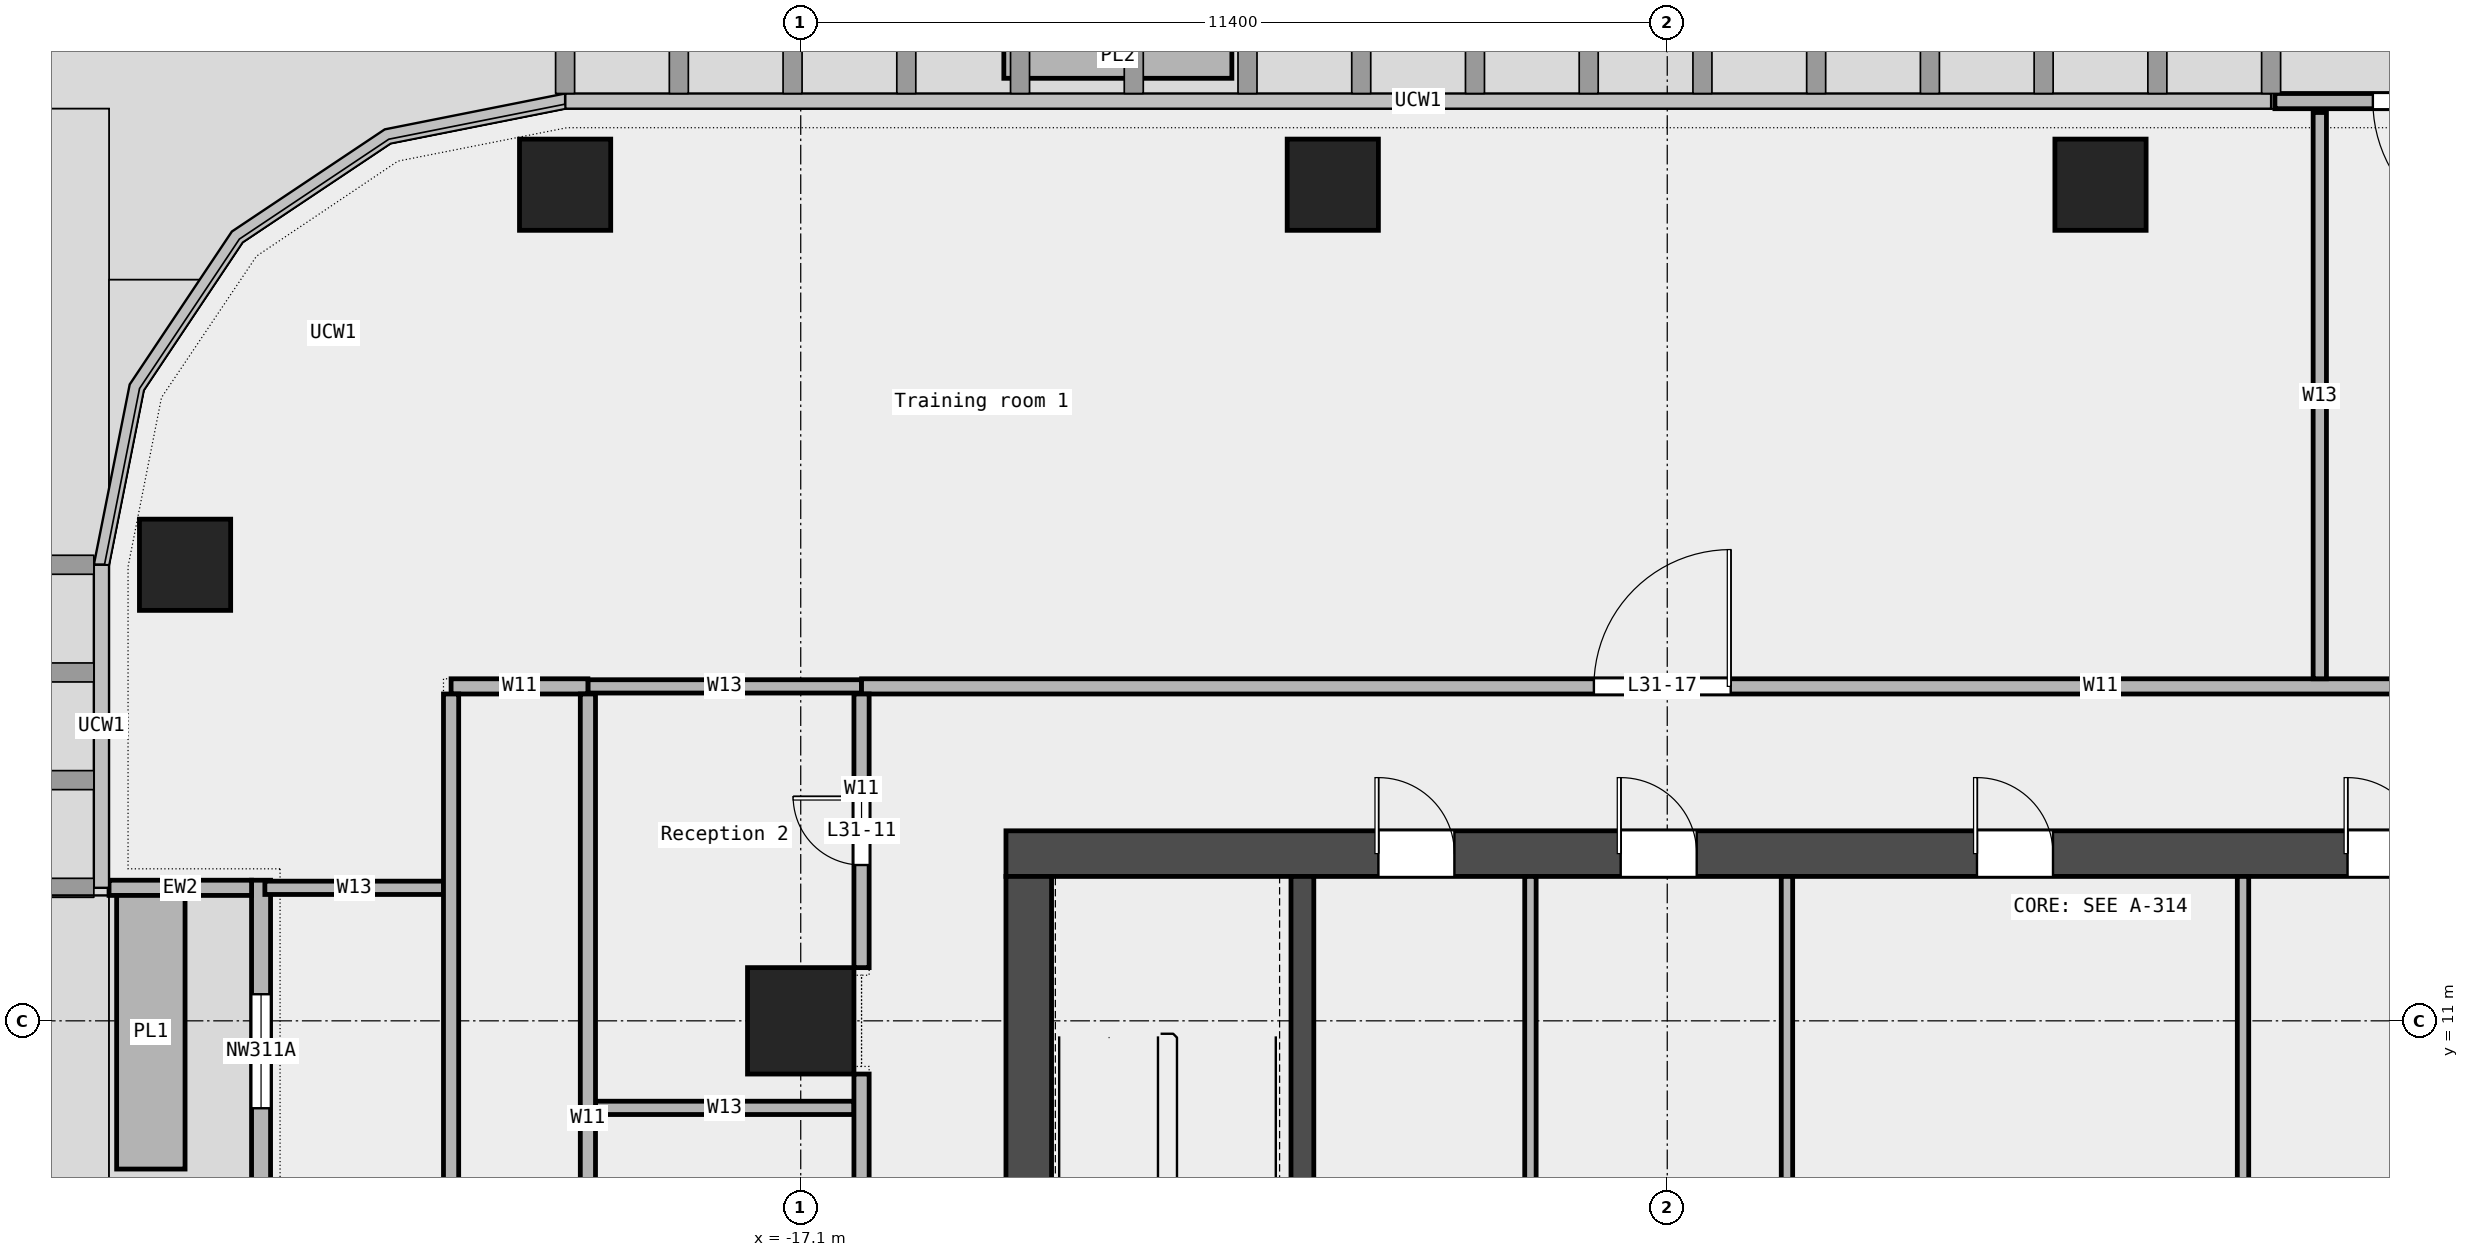
"""IFC4 building model, lengths in metres.
Left out: names, types, materials, properties, quantities, classifications, styles, units other than length and angle.
Written with IfcOpenShell. Run it as: python <this file> out.ifc"""

import sys

from ifc_helpers import new_model, si_unit, direction, frame, frame_2d, origin, origin_2d, place, context, subcontext, project, spatial, rectangle, extrude, element, fill, save


model = new_model("IFC4")
c1 = context("Model", 3, precision=1e-05, world=origin(), true_north=direction((0.0, 1.0)))
c2 = subcontext(c1, "Body", "Model", "MODEL_VIEW")
j1 = project(units=[si_unit("LENGTHUNIT", "METRE"), si_unit("PLANEANGLEUNIT", "RADIAN")], contexts=[c1])
p1 = place(None, origin())
s1 = spatial("IfcSite", under=j1, at=p1, CompositionType="ELEMENT")
p2 = place(p1, origin())
s2 = spatial("IfcBuilding", under=s1, at=p2, CompositionType="ELEMENT")
p3 = place(p2, frame((0.0, 0.0, 157.0)))
s3 = spatial("IfcBuildingStorey", under=s2, at=p3, CompositionType="ELEMENT", Elevation=157.0)
for number, where, z_axis, x_axis in (
    (1, (0.0, 22.0, 0.0), (0.0, 0.0, 1.0), (1.0, 0.0, 0.0)),
    (2, (-10.1, 22.0, 0.0), (0.0, 0.0, 1.0), (1.0, 0.0, 0.0)),
    (3, (-20.2, 22.0, 0.0), (0.0, 0.0, 1.0), (1.0, 0.0, 0.0)),
    (4, (-25.2, 17.0, 0.0), (0.0, 0.0, 1.0), (1.0, 0.0, 0.0)),
):
    element("IfcColumn", number, at=place(p3, frame(where, z_axis=z_axis, x_axis=x_axis)), inside=s3, PredefinedType="COLUMN", context=c2, shape_type="SweptSolid", body=[
        extrude(rectangle(XDim=1.2, YDim=1.2, at=origin_2d()), origin(), (0.0, 0.0, 1.0), 3.6),
    ])
p4 = place(p3, frame((-17.1, 11.0, 0.0), z_axis=(0.0, 0.0, 1.0), x_axis=(1.0, 0.0, 0.0)))
e5 = element("IfcColumn", 5, at=p4, inside=s3, PredefinedType="COLUMN", context=c2, shape_type="SweptSolid", body=[
    extrude(rectangle(XDim=1.4, YDim=1.4, at=origin_2d()), origin(), (0.0, 0.0, 1.0), 3.6),
])
p5 = place(p3, frame((-24.2, 12.85, 0.0), z_axis=(0.0, 0.0, 1.0), x_axis=(0.0, -1.0, 0.0)))
e6 = element("IfcWall", 6, at=p5, inside=s3, PredefinedType="STANDARD", context=c2, shape_type="SweptSolid", body=[
    extrude(rectangle(XDim=12.95, YDim=0.25, at=frame_2d((6.475, 0.0))), origin(), (0.0, 0.0, 1.0), 3.6),
])
p6 = place(p5, frame((1.5, 0.0, 0.45)))
e7 = element("IfcOpeningElement", 7, at=p6, cuts=e6, PredefinedType="OPENING", context=c2, shape_type="SweptSolid", body=[
    extrude(rectangle(XDim=1.5, YDim=2.4, at=frame_2d((0.75, 1.2))), frame((0.0, 0.137, 0.0), z_axis=(0.0, -1.0, 0.0), x_axis=(1.0, 0.0, 0.0)), (0.0, 0.0, 1.0), 0.274),
])
p7 = place(p5, frame((4.25, 0.0, 0.0)))
e8 = element("IfcOpeningElement", 8, at=p7, cuts=e6, PredefinedType="OPENING", context=c2, shape_type="SweptSolid", body=[
    extrude(rectangle(XDim=1.8, YDim=2.4, at=frame_2d((0.9, 1.2))), frame((0.0, 0.137, 0.0), z_axis=(0.0, -1.0, 0.0), x_axis=(1.0, 0.0, 0.0)), (0.0, 0.0, 1.0), 0.274),
])
p8 = place(p5, frame((10.0, 0.0, 0.45)))
e9 = element("IfcOpeningElement", 9, at=p8, cuts=e6, PredefinedType="OPENING", context=c2, shape_type="SweptSolid", body=[
    extrude(rectangle(XDim=1.5, YDim=2.4, at=frame_2d((0.75, 1.2))), frame((0.0, 0.137, 0.0), z_axis=(0.0, -1.0, 0.0), x_axis=(1.0, 0.0, 0.0)), (0.0, 0.0, 1.0), 0.274),
])
p9 = place(p3, frame((-26.2, 12.75, 0.0), z_axis=(0.0, 0.0, 1.0), x_axis=(1.0, 0.0, 0.0)))
e10 = element("IfcWall", 10, at=p9, inside=s3, PredefinedType="STANDARD", context=c2, shape_type="SweptSolid", body=[
    extrude(rectangle(XDim=1.875, YDim=0.2, at=frame_2d((0.938, 0.0))), origin(), (0.0, 0.0, 1.0), 3.6),
])
p10 = place(p3, frame((-25.65, 12.65, 0.0), z_axis=(0.0, 0.0, 1.0), x_axis=(0.0, -1.0, 0.0)))
e11 = element("IfcWall", 11, at=p10, inside=s3, PredefinedType="STANDARD", context=c2, shape_type="SweptSolid", body=[
    extrude(rectangle(XDim=3.6, YDim=0.9, at=frame_2d((1.8, 0.0))), origin(), (0.0, 0.0, 1.0), 0.7),
])
p11 = place(p3, frame((6.683, 23.1, 0.0), z_axis=(0.0, 0.0, 1.0), x_axis=(-1.0, 0.0, 0.0)))
e12 = element("IfcWall", 12, at=p11, inside=s3, PredefinedType="STANDARD", context=c2, shape_type="SweptSolid", body=[
    extrude(rectangle(XDim=4.389, YDim=0.2, at=frame_2d((2.194, 0.0))), origin(), (0.0, 0.0, 1.0), 3.6),
])
p12 = place(p11, frame((1.3, 0.0, 0.0)))
e13 = element("IfcOpeningElement", 13, at=p12, cuts=e12, PredefinedType="OPENING", context=c2, shape_type="SweptSolid", body=[
    extrude(rectangle(XDim=1.8, YDim=2.4, at=frame_2d((0.9, 1.2))), frame((0.0, 0.112, 0.0), z_axis=(0.0, -1.0, 0.0), x_axis=(1.0, 0.0, 0.0)), (0.0, 0.0, 1.0), 0.224),
])
p13 = place(p3, frame((-11.428, 23.7, 0.0), z_axis=(0.0, 0.0, 1.0), x_axis=(-1.0, 0.0, 0.0)))
e14 = element("IfcWall", 14, at=p13, inside=s3, PredefinedType="STANDARD", context=c2, shape_type="SweptSolid", body=[
    extrude(rectangle(XDim=3.0, YDim=0.6, at=frame_2d((1.5, 0.0))), origin(), (0.0, 0.0, 1.0), 0.7),
])
p14 = place(p3, frame((-19.8, 9.855, 0.0), z_axis=(0.0, 0.0, 1.0), x_axis=(1.0, 0.0, 0.0)))
e15 = element("IfcWall", 15, at=p14, inside=s3, PredefinedType="PARTITIONING", context=c2, shape_type="SweptSolid", body=[
    extrude(rectangle(XDim=3.4, YDim=0.175, at=frame_2d((1.7, 0.0))), origin(), (0.0, 0.0, 1.0), 3.6),
])
p15 = place(p3, frame((-24.15, 12.75, 0.0), z_axis=(0.0, 0.0, 1.0), x_axis=(1.0, 0.0, 0.0)))
e16 = element("IfcWall", 16, at=p15, inside=s3, PredefinedType="PARTITIONING", context=c2, shape_type="SweptSolid", body=[
    extrude(rectangle(XDim=2.35, YDim=0.175, at=frame_2d((1.175, 0.0))), origin(), (0.0, 0.0, 1.0), 3.6),
])
p16 = place(p3, frame((-19.9, 15.4, 0.0), z_axis=(0.0, 0.0, 1.0), x_axis=(1.0, 0.0, 0.0)))
e17 = element("IfcWall", 17, at=p16, inside=s3, PredefinedType="PARTITIONING", context=c2, shape_type="SweptSolid", body=[
    extrude(rectangle(XDim=3.6, YDim=0.175, at=frame_2d((1.8, 0.0))), origin(), (0.0, 0.0, 1.0), 3.6),
])
p17 = place(p3, frame((-21.7, 15.4, 0.0), z_axis=(0.0, 0.0, 1.0), x_axis=(1.0, 0.0, 0.0)))
e18 = element("IfcWall", 18, at=p17, inside=s3, PredefinedType="PARTITIONING", context=c2, shape_type="SweptSolid", body=[
    extrude(rectangle(XDim=1.8, YDim=0.2, at=frame_2d((0.9, 0.0))), origin(), (0.0, 0.0, 1.0), 3.6),
])
p18 = place(p3, frame((-16.3, 15.4, 0.0), z_axis=(0.0, 0.0, 1.0), x_axis=(1.0, 0.0, 0.0)))
e19 = element("IfcWall", 19, at=p18, inside=s3, PredefinedType="PARTITIONING", context=c2, shape_type="SweptSolid", body=[
    extrude(rectangle(XDim=32.6, YDim=0.2, at=frame_2d((16.3, 0.0))), origin(), (0.0, 0.0, 1.0), 3.6),
])
p19 = place(p18, frame((24.992, 0.0, 0.0)))
e20 = element("IfcOpeningElement", 20, at=p19, cuts=e19, PredefinedType="OPENING", context=c2, shape_type="SweptSolid", body=[
    extrude(rectangle(XDim=1.8, YDim=2.1, at=frame_2d((0.9, 1.05))), frame((0.0, 0.112, 0.0), z_axis=(0.0, -1.0, 0.0), x_axis=(1.0, 0.0, 0.0)), (0.0, 0.0, 1.0), 0.224),
])
p20 = place(p18, frame((9.635, 0.0, 0.0)))
e21 = element("IfcOpeningElement", 21, at=p20, cuts=e19, PredefinedType="OPENING", context=c2, shape_type="SweptSolid", body=[
    extrude(rectangle(XDim=1.8, YDim=2.1, at=frame_2d((0.9, 1.05))), frame((0.0, 0.112, 0.0), z_axis=(0.0, -1.0, 0.0), x_axis=(1.0, 0.0, 0.0)), (0.0, 0.0, 1.0), 0.224),
])
p21 = place(p3, frame((-21.7, -9.0, 0.0), z_axis=(0.0, 0.0, 1.0), x_axis=(0.0, 1.0, 0.0)))
e22 = element("IfcWall", 22, at=p21, inside=s3, PredefinedType="PARTITIONING", context=c2, shape_type="SweptSolid", body=[
    extrude(rectangle(XDim=24.3, YDim=0.2, at=frame_2d((12.15, 0.0))), origin(), (0.0, 0.0, 1.0), 3.6),
])
p22 = place(p21, frame((14.925, 0.0, 0.0)))
e23 = element("IfcOpeningElement", 23, at=p22, cuts=e22, PredefinedType="OPENING", context=c2, shape_type="SweptSolid", body=[
    extrude(rectangle(XDim=0.9, YDim=2.1, at=frame_2d((0.45, 1.05))), frame((0.0, 0.112, 0.0), z_axis=(0.0, -1.0, 0.0), x_axis=(1.0, 0.0, 0.0)), (0.0, 0.0, 1.0), 0.224),
])
p23 = place(p21, frame((4.05, 0.0, 0.0)))
e24 = element("IfcOpeningElement", 24, at=p23, cuts=e22, PredefinedType="OPENING", context=c2, shape_type="SweptSolid", body=[
    extrude(rectangle(XDim=0.9, YDim=2.1, at=frame_2d((0.45, 1.05))), frame((0.0, 0.112, 0.0), z_axis=(0.0, -1.0, 0.0), x_axis=(1.0, 0.0, 0.0)), (0.0, 0.0, 1.0), 0.224),
])
p24 = place(p3, frame((-19.9, 4.15, 0.0), z_axis=(0.0, 0.0, 1.0), x_axis=(0.0, 1.0, 0.0)))
e25 = element("IfcWall", 25, at=p24, inside=s3, PredefinedType="PARTITIONING", context=c2, shape_type="SweptSolid", body=[
    extrude(rectangle(XDim=11.15, YDim=0.2, at=frame_2d((5.575, 0.0))), origin(), (0.0, 0.0, 1.0), 3.6),
])
p25 = place(p3, frame((-16.3, 4.15, 0.0), z_axis=(0.0, 0.0, 1.0), x_axis=(0.0, 1.0, 0.0)))
e26 = element("IfcWall", 26, at=p25, inside=s3, PredefinedType="PARTITIONING", context=c2, shape_type="SweptSolid", body=[
    extrude(rectangle(XDim=6.15, YDim=0.2, at=frame_2d((3.075, 0.0))), origin(), (0.0, 0.0, 1.0), 3.6),
])
p26 = place(p25, frame((2.403, 0.0, 0.0)))
e27 = element("IfcOpeningElement", 27, at=p26, cuts=e26, PredefinedType="OPENING", context=c2, shape_type="SweptSolid", body=[
    extrude(rectangle(XDim=0.9, YDim=2.1, at=frame_2d((0.45, 1.05))), frame((0.0, 0.112, 0.0), z_axis=(0.0, -1.0, 0.0), x_axis=(1.0, 0.0, 0.0)), (0.0, 0.0, 1.0), 0.224),
])
p27 = place(p3, frame((-16.3, 11.7, 0.0), z_axis=(0.0, 0.0, 1.0), x_axis=(0.0, 1.0, 0.0)))
e28 = element("IfcWall", 28, at=p27, inside=s3, PredefinedType="PARTITIONING", context=c2, shape_type="SweptSolid", body=[
    extrude(rectangle(XDim=3.6, YDim=0.2, at=frame_2d((1.8, 0.0))), origin(), (0.0, 0.0, 1.0), 3.6),
])
p28 = place(p27, frame((1.35, 0.0, 0.0)))
e29 = element("IfcOpeningElement", 29, at=p28, cuts=e28, PredefinedType="OPENING", context=c2, shape_type="SweptSolid", body=[
    extrude(rectangle(XDim=0.9, YDim=2.1, at=frame_2d((0.45, 1.05))), frame((0.0, 0.112, 0.0), z_axis=(0.0, -1.0, 0.0), x_axis=(1.0, 0.0, 0.0)), (0.0, 0.0, 1.0), 0.224),
])
p29 = place(p3, frame((2.885, 15.5, 0.0), z_axis=(0.0, 0.0, 1.0), x_axis=(0.0, 1.0, 0.0)))
e30 = element("IfcWall", 30, at=p29, inside=s3, PredefinedType="PARTITIONING", context=c2, shape_type="SweptSolid", body=[
    extrude(rectangle(XDim=7.45, YDim=0.175, at=frame_2d((3.725, 0.0))), origin(), (0.0, 0.0, 1.0), 3.6),
])
p30 = place(p3, frame((-14.4, 13.2, 0.0), z_axis=(0.0, 0.0, 1.0), x_axis=(1.0, 0.0, 0.0)))
e31 = element("IfcWall", 31, at=p30, inside=s3, PredefinedType="SHEAR", context=c2, shape_type="SweptSolid", body=[
    extrude(rectangle(XDim=28.8, YDim=0.6, at=frame_2d((14.4, 0.0))), origin(), (0.0, 0.0, 1.0), 3.7),
])
p31 = place(p30, frame((4.9, 0.0, 0.0)))
e32 = element("IfcOpeningElement", 32, at=p31, cuts=e31, PredefinedType="OPENING", context=c2, shape_type="SweptSolid", body=[
    extrude(rectangle(XDim=1.0, YDim=2.1, at=frame_2d((0.5, 1.05))), frame((0.0, 0.312, 0.0), z_axis=(0.0, -1.0, 0.0), x_axis=(1.0, 0.0, 0.0)), (0.0, 0.0, 1.0), 0.624),
])
p32 = place(p30, frame((8.087, 0.0, 0.0)))
e33 = element("IfcOpeningElement", 33, at=p32, cuts=e31, PredefinedType="OPENING", context=c2, shape_type="SweptSolid", body=[
    extrude(rectangle(XDim=1.0, YDim=2.1, at=frame_2d((0.5, 1.05))), frame((0.0, 0.312, 0.0), z_axis=(0.0, -1.0, 0.0), x_axis=(1.0, 0.0, 0.0)), (0.0, 0.0, 1.0), 0.624),
])
p33 = place(p30, frame((12.775, 0.0, 0.0)))
e34 = element("IfcOpeningElement", 34, at=p33, cuts=e31, PredefinedType="OPENING", context=c2, shape_type="SweptSolid", body=[
    extrude(rectangle(XDim=1.0, YDim=2.1, at=frame_2d((0.5, 1.05))), frame((0.0, 0.312, 0.0), z_axis=(0.0, -1.0, 0.0), x_axis=(1.0, 0.0, 0.0)), (0.0, 0.0, 1.0), 0.624),
])
p34 = place(p30, frame((17.65, 0.0, 0.0)))
e35 = element("IfcOpeningElement", 35, at=p34, cuts=e31, PredefinedType="OPENING", context=c2, shape_type="SweptSolid", body=[
    extrude(rectangle(XDim=1.0, YDim=2.1, at=frame_2d((0.5, 1.05))), frame((0.0, 0.312, 0.0), z_axis=(0.0, -1.0, 0.0), x_axis=(1.0, 0.0, 0.0)), (0.0, 0.0, 1.0), 0.624),
])
p35 = place(p30, frame((21.962, 0.0, 0.0)))
e36 = element("IfcOpeningElement", 36, at=p35, cuts=e31, PredefinedType="OPENING", context=c2, shape_type="SweptSolid", body=[
    extrude(rectangle(XDim=1.0, YDim=2.1, at=frame_2d((0.5, 1.05))), frame((0.0, 0.312, 0.0), z_axis=(0.0, -1.0, 0.0), x_axis=(1.0, 0.0, 0.0)), (0.0, 0.0, 1.0), 0.624),
])
p36 = place(p3, frame((-14.1, -6.6, 0.0), z_axis=(0.0, 0.0, 1.0), x_axis=(0.0, 1.0, 0.0)))
e37 = element("IfcWall", 37, at=p36, inside=s3, PredefinedType="SHEAR", context=c2, shape_type="SweptSolid", body=[
    extrude(rectangle(XDim=19.5, YDim=0.6, at=frame_2d((9.75, 0.0))), origin(), (0.0, 0.0, 1.0), 3.7),
])
p37 = place(p36, frame((9.3, 0.0, 0.0)))
e38 = element("IfcOpeningElement", 38, at=p37, cuts=e37, PredefinedType="OPENING", context=c2, shape_type="SweptSolid", body=[
    extrude(rectangle(XDim=1.8, YDim=2.1, at=frame_2d((0.9, 1.05))), frame((0.0, 0.312, 0.0), z_axis=(0.0, -1.0, 0.0), x_axis=(1.0, 0.0, 0.0)), (0.0, 0.0, 1.0), 0.624),
])
p38 = place(p3, frame((-10.5, 5.25, 0.0), z_axis=(0.0, 0.0, 1.0), x_axis=(0.0, 1.0, 0.0)))
e39 = element("IfcWall", 39, at=p38, inside=s3, PredefinedType="SHEAR", context=c2, shape_type="SweptSolid", body=[
    extrude(rectangle(XDim=7.65, YDim=0.3, at=frame_2d((3.825, 0.0))), origin(), (0.0, 0.0, 1.0), 3.7),
])
for number, where, z_axis, x_axis in (
    (40, (-7.5, 8.55, 0.0), (0.0, 0.0, 1.0), (0.0, 1.0, 0.0)),
    (41, (-4.125, 8.55, 0.0), (0.0, 0.0, 1.0), (0.0, 1.0, 0.0)),
    (42, (1.875, 8.55, 0.0), (0.0, 0.0, 1.0), (0.0, 1.0, 0.0)),
):
    element("IfcWall", number, at=place(p3, frame(where, z_axis=z_axis, x_axis=x_axis)), inside=s3, PredefinedType="PARTITIONING", context=c2, shape_type="SweptSolid", body=[
        extrude(rectangle(XDim=4.35, YDim=0.15, at=frame_2d((2.175, 0.0))), origin(), (0.0, 0.0, 1.0), 3.7),
    ])
p39 = place(p6, origin())
e43 = element("IfcWindow", 43, at=p39, inside=s3, PartitioningType="SINGLE_PANEL", PredefinedType="WINDOW", context=c2, shape_type="SweptSolid", body=[
    extrude(rectangle(XDim=1.5, YDim=2.4, at=frame_2d((0.75, 1.2))), frame((0.0, 0.03, 0.0), z_axis=(0.0, -1.0, 0.0), x_axis=(1.0, 0.0, 0.0)), (0.0, 0.0, 1.0), 0.06),
])
fill(e7, e43)
p40 = place(p12, origin())
e44 = element("IfcDoor", 44, at=p40, inside=s3, OperationType="DOUBLE_DOOR_SINGLE_SWING", PredefinedType="DOOR", context=c2, shape_type="SweptSolid", body=[
    extrude(rectangle(XDim=1.8, YDim=2.4, at=frame_2d((0.9, 1.2))), frame((0.0, 0.025, 0.0), z_axis=(0.0, -1.0, 0.0), x_axis=(1.0, 0.0, 0.0)), (0.0, 0.0, 1.0), 0.05),
])
fill(e13, e44)
p41 = place(p28, origin())
e45 = element("IfcDoor", 45, at=p41, inside=s3, OperationType="SINGLE_SWING_RIGHT", PredefinedType="DOOR", context=c2, shape_type="SweptSolid", body=[
    extrude(rectangle(XDim=0.9, YDim=2.1, at=frame_2d((0.45, 1.05))), frame((0.0, 0.025, 0.0), z_axis=(0.0, -1.0, 0.0), x_axis=(1.0, 0.0, 0.0)), (0.0, 0.0, 1.0), 0.05),
])
fill(e29, e45)
p42 = place(p20, origin())
e46 = element("IfcDoor", 46, at=p42, inside=s3, OperationType="DOUBLE_DOOR_SINGLE_SWING", PredefinedType="DOOR", context=c2, shape_type="SweptSolid", body=[
    extrude(rectangle(XDim=1.8, YDim=2.1, at=frame_2d((0.9, 1.05))), frame((0.0, 0.025, 0.0), z_axis=(0.0, -1.0, 0.0), x_axis=(1.0, 0.0, 0.0)), (0.0, 0.0, 1.0), 0.05),
])
fill(e21, e46)
p43 = place(p31, origin())
e47 = element("IfcDoor", 47, at=p43, inside=s3, OperationType="SINGLE_SWING_LEFT", PredefinedType="DOOR", context=c2, shape_type="SweptSolid", body=[
    extrude(rectangle(XDim=1.0, YDim=2.1, at=frame_2d((0.5, 1.05))), frame((0.0, 0.025, 0.0), z_axis=(0.0, -1.0, 0.0), x_axis=(1.0, 0.0, 0.0)), (0.0, 0.0, 1.0), 0.05),
])
fill(e32, e47)
p44 = place(p32, origin())
e48 = element("IfcDoor", 48, at=p44, inside=s3, OperationType="SINGLE_SWING_LEFT", PredefinedType="DOOR", context=c2, shape_type="SweptSolid", body=[
    extrude(rectangle(XDim=1.0, YDim=2.1, at=frame_2d((0.5, 1.05))), frame((0.0, 0.025, 0.0), z_axis=(0.0, -1.0, 0.0), x_axis=(1.0, 0.0, 0.0)), (0.0, 0.0, 1.0), 0.05),
])
fill(e33, e48)
p45 = place(p33, origin())
e49 = element("IfcDoor", 49, at=p45, inside=s3, OperationType="SINGLE_SWING_LEFT", PredefinedType="DOOR", context=c2, shape_type="SweptSolid", body=[
    extrude(rectangle(XDim=1.0, YDim=2.1, at=frame_2d((0.5, 1.05))), frame((0.0, 0.025, 0.0), z_axis=(0.0, -1.0, 0.0), x_axis=(1.0, 0.0, 0.0)), (0.0, 0.0, 1.0), 0.05),
])
fill(e34, e49)
p46 = place(p34, origin())
e50 = element("IfcDoor", 50, at=p46, inside=s3, OperationType="SINGLE_SWING_LEFT", PredefinedType="DOOR", context=c2, shape_type="SweptSolid", body=[
    extrude(rectangle(XDim=1.0, YDim=2.1, at=frame_2d((0.5, 1.05))), frame((0.0, 0.025, 0.0), z_axis=(0.0, -1.0, 0.0), x_axis=(1.0, 0.0, 0.0)), (0.0, 0.0, 1.0), 0.05),
])
fill(e35, e50)
save(model, sys.argv[1])
